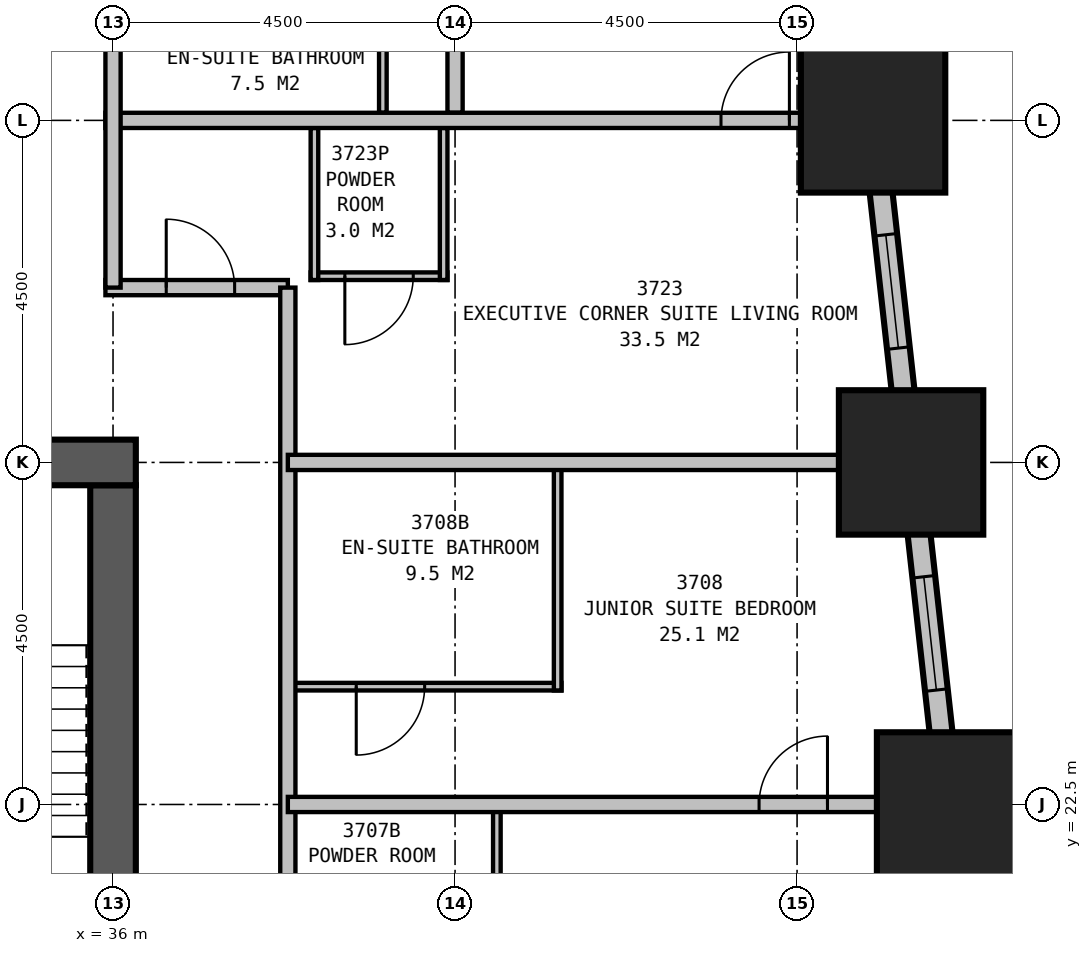
"""IFC4 building model, lengths in metres.
Left out: names, types, materials, properties, quantities, classifications, styles, units other than length and angle.
Written with IfcOpenShell. Run it as: python <this file> out.ifc"""

import sys

from ifc_helpers import new_model, si_unit, direction, frame, frame_2d, origin, origin_2d, place, context, subcontext, project, spatial, rectangle, extrude, element, fill, save


model = new_model("IFC4")
c1 = context("Model", 3, precision=1e-05, world=origin(), true_north=direction((0.0, 1.0)))
c2 = subcontext(c1, "Body", "Model", "MODEL_VIEW")
j1 = project(units=[si_unit("LENGTHUNIT", "METRE"), si_unit("PLANEANGLEUNIT", "RADIAN")], contexts=[c1])
p1 = place(None, origin())
s1 = spatial("IfcSite", under=j1, at=p1, CompositionType="ELEMENT")
p2 = place(p1, origin())
s2 = spatial("IfcBuilding", under=s1, at=p2, CompositionType="ELEMENT")
p3 = place(p2, frame((0.0, 0.0, 142.4)))
s3 = spatial("IfcBuildingStorey", under=s2, at=p3, CompositionType="ELEMENT", Elevation=142.4)
for number, where, z_axis, x_axis in (
    (1, (47.0, 22.5, 0.0), (0.0, 0.0, 1.0), (1.0, 0.0, 0.0)),
    (2, (46.5, 27.0, 0.0), (0.0, 0.0, 1.0), (1.0, 0.0, 0.0)),
    (3, (46.0, 31.5, 0.0), (0.0, 0.0, 1.0), (1.0, 0.0, 0.0)),
):
    element("IfcColumn", number, at=place(p3, frame(where, z_axis=z_axis, x_axis=x_axis)), inside=s3, PredefinedType="COLUMN", context=c2, shape_type="SweptSolid", body=[
        extrude(rectangle(XDim=1.9, YDim=1.9, at=origin_2d()), origin(), (0.0, 0.0, 1.0), 3.5),
    ])
p4 = place(p3, frame((36.3, 27.0, 0.0), z_axis=(0.0, 0.0, 1.0), x_axis=(-1.0, 0.0, 0.0)))
e4 = element("IfcWall", 4, at=p4, inside=s3, PredefinedType="SHEAR", context=c2, shape_type="SweptSolid", body=[
    extrude(rectangle(XDim=23.1, YDim=0.6, at=frame_2d((11.55, 0.0))), origin(), (0.0, 0.0, 1.0), 3.5),
])
p5 = place(p4, frame((17.05, 0.0, 0.0)))
e5 = element("IfcOpeningElement", 5, at=p5, cuts=e4, PredefinedType="OPENING", context=c2, shape_type="SweptSolid", body=[
    extrude(rectangle(XDim=1.0, YDim=2.1, at=frame_2d((0.5, 1.05))), frame((0.0, 0.31, 0.0), z_axis=(0.0, -1.0, 0.0), x_axis=(1.0, 0.0, 0.0)), (0.0, 0.0, 1.0), 0.62),
])
p6 = place(p4, frame((12.05, 0.0, 0.0)))
e6 = element("IfcOpeningElement", 6, at=p6, cuts=e4, PredefinedType="OPENING", context=c2, shape_type="SweptSolid", body=[
    extrude(rectangle(XDim=1.0, YDim=2.1, at=frame_2d((0.5, 1.05))), frame((0.0, 0.31, 0.0), z_axis=(0.0, -1.0, 0.0), x_axis=(1.0, 0.0, 0.0)), (0.0, 0.0, 1.0), 0.62),
])
p7 = place(p4, frame((7.05, 0.0, 0.0)))
e7 = element("IfcOpeningElement", 7, at=p7, cuts=e4, PredefinedType="OPENING", context=c2, shape_type="SweptSolid", body=[
    extrude(rectangle(XDim=1.0, YDim=2.1, at=frame_2d((0.5, 1.05))), frame((0.0, 0.31, 0.0), z_axis=(0.0, -1.0, 0.0), x_axis=(1.0, 0.0, 0.0)), (0.0, 0.0, 1.0), 0.62),
])
p8 = place(p3, frame((36.0, 20.0, 0.0), z_axis=(0.0, 0.0, 1.0), x_axis=(0.0, 1.0, 0.0)))
e8 = element("IfcWall", 8, at=p8, inside=s3, PredefinedType="SHEAR", context=c2, shape_type="SweptSolid", body=[
    extrude(rectangle(XDim=6.7, YDim=0.6, at=frame_2d((3.35, 0.0))), origin(), (0.0, 0.0, 1.0), 3.5),
])
p9 = place(p3, frame((49.017, 4.351, 0.0), z_axis=(0.0, 0.0, 1.0), x_axis=(-0.110433201132, 0.993883548555, 0.0)))
e9 = element("IfcWall", 9, at=p9, inside=s3, PredefinedType="STANDARD", context=c2, shape_type="SweptSolid", body=[
    extrude(rectangle(XDim=31.994, YDim=0.3, at=frame_2d((15.997, 0.0))), origin(), (0.0, 0.0, 1.0), 2.1),
])
p10 = place(p9, frame((1.664, 0.0, 0.5)))
e10 = element("IfcOpeningElement", 10, at=p10, cuts=e9, PredefinedType="OPENING", context=c2, shape_type="SweptSolid", body=[
    extrude(rectangle(XDim=1.5, YDim=1.4, at=frame_2d((0.75, 0.7))), frame((0.0, 0.16, 0.0), z_axis=(0.0, -1.0, 0.0), x_axis=(1.0, 0.0, 0.0)), (0.0, 0.0, 1.0), 0.32),
])
p11 = place(p9, frame((6.192, 0.0, 0.5)))
e11 = element("IfcOpeningElement", 11, at=p11, cuts=e9, PredefinedType="OPENING", context=c2, shape_type="SweptSolid", body=[
    extrude(rectangle(XDim=1.5, YDim=1.4, at=frame_2d((0.75, 0.7))), frame((0.0, 0.16, 0.0), z_axis=(0.0, -1.0, 0.0), x_axis=(1.0, 0.0, 0.0)), (0.0, 0.0, 1.0), 0.32),
])
p12 = place(p9, frame((10.719, 0.0, 0.5)))
e12 = element("IfcOpeningElement", 12, at=p12, cuts=e9, PredefinedType="OPENING", context=c2, shape_type="SweptSolid", body=[
    extrude(rectangle(XDim=1.5, YDim=1.4, at=frame_2d((0.75, 0.7))), frame((0.0, 0.16, 0.0), z_axis=(0.0, -1.0, 0.0), x_axis=(1.0, 0.0, 0.0)), (0.0, 0.0, 1.0), 0.32),
])
p13 = place(p9, frame((15.247, 0.0, 0.5)))
e13 = element("IfcOpeningElement", 13, at=p13, cuts=e9, PredefinedType="OPENING", context=c2, shape_type="SweptSolid", body=[
    extrude(rectangle(XDim=1.5, YDim=1.4, at=frame_2d((0.75, 0.7))), frame((0.0, 0.16, 0.0), z_axis=(0.0, -1.0, 0.0), x_axis=(1.0, 0.0, 0.0)), (0.0, 0.0, 1.0), 0.32),
])
p14 = place(p9, frame((19.775, 0.0, 0.5)))
e14 = element("IfcOpeningElement", 14, at=p14, cuts=e9, PredefinedType="OPENING", context=c2, shape_type="SweptSolid", body=[
    extrude(rectangle(XDim=1.5, YDim=1.4, at=frame_2d((0.75, 0.7))), frame((0.0, 0.16, 0.0), z_axis=(0.0, -1.0, 0.0), x_axis=(1.0, 0.0, 0.0)), (0.0, 0.0, 1.0), 0.32),
])
p15 = place(p9, frame((24.302, 0.0, 0.5)))
e15 = element("IfcOpeningElement", 15, at=p15, cuts=e9, PredefinedType="OPENING", context=c2, shape_type="SweptSolid", body=[
    extrude(rectangle(XDim=1.5, YDim=1.4, at=frame_2d((0.75, 0.7))), frame((0.0, 0.16, 0.0), z_axis=(0.0, -1.0, 0.0), x_axis=(1.0, 0.0, 0.0)), (0.0, 0.0, 1.0), 0.32),
])
p16 = place(p9, frame((28.83, 0.0, 0.5)))
e16 = element("IfcOpeningElement", 16, at=p16, cuts=e9, PredefinedType="OPENING", context=c2, shape_type="SweptSolid", body=[
    extrude(rectangle(XDim=1.5, YDim=1.4, at=frame_2d((0.75, 0.7))), frame((0.0, 0.16, 0.0), z_axis=(0.0, -1.0, 0.0), x_axis=(1.0, 0.0, 0.0)), (0.0, 0.0, 1.0), 0.32),
])
p17 = place(p3, frame((35.9, 29.3, 0.0), z_axis=(0.0, 0.0, 1.0), x_axis=(1.0, 0.0, 0.0)))
e17 = element("IfcWall", 17, at=p17, inside=s3, PredefinedType="PARTITIONING", context=c2, shape_type="SweptSolid", body=[
    extrude(rectangle(XDim=2.4, YDim=0.2, at=frame_2d((1.2, 0.0))), origin(), (0.0, 0.0, 1.0), 3.25),
])
p18 = place(p17, frame((0.8, 0.0, 0.0)))
e18 = element("IfcOpeningElement", 18, at=p18, cuts=e17, PredefinedType="OPENING", context=c2, shape_type="SweptSolid", body=[
    extrude(rectangle(XDim=0.9, YDim=2.1, at=frame_2d((0.45, 1.05))), frame((0.0, 0.11, 0.0), z_axis=(0.0, -1.0, 0.0), x_axis=(1.0, 0.0, 0.0)), (0.0, 0.0, 1.0), 0.22),
])
p19 = place(p3, frame((38.3, 11.2, 0.0), z_axis=(0.0, 0.0, 1.0), x_axis=(0.0, 1.0, 0.0)))
e19 = element("IfcWall", 19, at=p19, inside=s3, PredefinedType="PARTITIONING", context=c2, shape_type="SweptSolid", body=[
    extrude(rectangle(XDim=18.1, YDim=0.2, at=frame_2d((9.05, 0.0))), origin(), (0.0, 0.0, 1.0), 3.25),
])
p20 = place(p19, frame((5.0, 0.0, 0.0), z_axis=(0.0, 0.0, 1.0), x_axis=(-1.0, 0.0, 0.0)))
e20 = element("IfcOpeningElement", 20, at=p20, cuts=e19, PredefinedType="OPENING", context=c2, shape_type="SweptSolid", body=[
    extrude(rectangle(XDim=1.0, YDim=2.1, at=frame_2d((0.5, 1.05))), frame((0.0, 0.11, 0.0), z_axis=(0.0, -1.0, 0.0), x_axis=(1.0, 0.0, 0.0)), (0.0, 0.0, 1.0), 0.22),
])
p21 = place(p19, frame((8.55, 0.0, 0.0), z_axis=(0.0, 0.0, 1.0), x_axis=(-1.0, 0.0, 0.0)))
e21 = element("IfcOpeningElement", 21, at=p21, cuts=e19, PredefinedType="OPENING", context=c2, shape_type="SweptSolid", body=[
    extrude(rectangle(XDim=0.9, YDim=2.1, at=frame_2d((0.45, 1.05))), frame((0.0, 0.11, 0.0), z_axis=(0.0, -1.0, 0.0), x_axis=(1.0, 0.0, 0.0)), (0.0, 0.0, 1.0), 0.22),
])
p22 = place(p3, frame((38.3, 22.5, 0.0), z_axis=(0.0, 0.0, 1.0), x_axis=(1.0, 0.0, 0.0)))
e22 = element("IfcWall", 22, at=p22, inside=s3, PredefinedType="PARTITIONING", context=c2, shape_type="SweptSolid", body=[
    extrude(rectangle(XDim=8.699, YDim=0.2, at=frame_2d((4.35, 0.0))), origin(), (0.0, 0.0, 1.0), 2.2),
])
p23 = place(p22, frame((6.2, 0.0, 0.0)))
e23 = element("IfcOpeningElement", 23, at=p23, cuts=e22, PredefinedType="OPENING", context=c2, shape_type="SweptSolid", body=[
    extrude(rectangle(XDim=0.9, YDim=2.1, at=frame_2d((0.45, 1.05))), frame((0.0, 0.11, 0.0), z_axis=(0.0, -1.0, 0.0), x_axis=(1.0, 0.0, 0.0)), (0.0, 0.0, 1.0), 0.22),
])
p24 = place(p3, frame((41.05, 20.1, 0.0), z_axis=(0.0, 0.0, 1.0), x_axis=(0.0, 1.0, 0.0)))
e24 = element("IfcWall", 24, at=p24, inside=s3, PredefinedType="PLUMBINGWALL", context=c2, shape_type="SweptSolid", body=[
    extrude(rectangle(XDim=2.4, YDim=0.1, at=frame_2d((1.2, 0.0))), origin(), (0.0, 0.0, 1.0), 3.25),
])
p25 = place(p3, frame((41.85, 24.0, 0.0), z_axis=(0.0, 0.0, 1.0), x_axis=(0.0, 1.0, 0.0)))
e25 = element("IfcWall", 25, at=p25, inside=s3, PredefinedType="PLUMBINGWALL", context=c2, shape_type="SweptSolid", body=[
    extrude(rectangle(XDim=3.0, YDim=0.1, at=frame_2d((1.5, 0.0))), origin(), (0.0, 0.0, 1.0), 3.25),
])
p26 = place(p3, frame((38.3, 24.05, 0.0), z_axis=(0.0, 0.0, 1.0), x_axis=(1.0, 0.0, 0.0)))
e26 = element("IfcWall", 26, at=p26, inside=s3, PredefinedType="PLUMBINGWALL", context=c2, shape_type="SweptSolid", body=[
    extrude(rectangle(XDim=3.6, YDim=0.1, at=frame_2d((1.8, 0.0))), origin(), (0.0, 0.0, 1.0), 3.25),
])
p27 = place(p26, frame((1.8, 0.0, 0.0), z_axis=(0.0, 0.0, 1.0), x_axis=(-1.0, 0.0, 0.0)))
e27 = element("IfcOpeningElement", 27, at=p27, cuts=e26, PredefinedType="OPENING", context=c2, shape_type="SweptSolid", body=[
    extrude(rectangle(XDim=0.9, YDim=2.1, at=frame_2d((0.45, 1.05))), frame((0.0, 0.06, 0.0), z_axis=(0.0, -1.0, 0.0), x_axis=(1.0, 0.0, 0.0)), (0.0, 0.0, 1.0), 0.12),
])
p28 = place(p3, frame((38.3, 27.0, 0.0), z_axis=(0.0, 0.0, 1.0), x_axis=(1.0, 0.0, 0.0)))
e28 = element("IfcWall", 28, at=p28, inside=s3, PredefinedType="PARTITIONING", context=c2, shape_type="SweptSolid", body=[
    extrude(rectangle(XDim=7.977, YDim=0.2, at=frame_2d((3.988, 0.0))), origin(), (0.0, 0.0, 1.0), 1.9),
])
p29 = place(p3, frame((36.0, 29.3, 0.0), z_axis=(0.0, 0.0, 1.0), x_axis=(0.0, 1.0, 0.0)))
e29 = element("IfcWall", 29, at=p29, inside=s3, PredefinedType="PARTITIONING", context=c2, shape_type="SweptSolid", body=[
    extrude(rectangle(XDim=11.2, YDim=0.2, at=frame_2d((5.6, 0.0))), origin(), (0.0, 0.0, 1.0), 2.2),
])
p30 = place(p3, frame((35.9, 31.5, 0.0), z_axis=(0.0, 0.0, 1.0), x_axis=(1.0, 0.0, 0.0)))
e30 = element("IfcWall", 30, at=p30, inside=s3, PredefinedType="PARTITIONING", context=c2, shape_type="SweptSolid", body=[
    extrude(rectangle(XDim=10.099, YDim=0.2, at=frame_2d((5.05, 0.0))), origin(), (0.0, 0.0, 1.0), 3.25),
])
p31 = place(p30, frame((8.099, 0.0, 0.0)))
e31 = element("IfcOpeningElement", 31, at=p31, cuts=e30, PredefinedType="OPENING", context=c2, shape_type="SweptSolid", body=[
    extrude(rectangle(XDim=0.9, YDim=2.1, at=frame_2d((0.45, 1.05))), frame((0.0, 0.11, 0.0), z_axis=(0.0, -1.0, 0.0), x_axis=(1.0, 0.0, 0.0)), (0.0, 0.0, 1.0), 0.22),
])
p32 = place(p3, frame((40.35, 31.4, 0.0), z_axis=(0.0, 0.0, 1.0), x_axis=(0.0, -1.0, 0.0)))
e32 = element("IfcWall", 32, at=p32, inside=s3, PredefinedType="PLUMBINGWALL", context=c2, shape_type="SweptSolid", body=[
    extrude(rectangle(XDim=2.0, YDim=0.1, at=frame_2d((1.0, 0.0))), origin(), (0.0, 0.0, 1.0), 2.2),
])
p33 = place(p3, frame((38.65, 31.4, 0.0), z_axis=(0.0, 0.0, 1.0), x_axis=(0.0, -1.0, 0.0)))
e33 = element("IfcWall", 33, at=p33, inside=s3, PredefinedType="PLUMBINGWALL", context=c2, shape_type="SweptSolid", body=[
    extrude(rectangle(XDim=2.0, YDim=0.1, at=frame_2d((1.0, 0.0))), origin(), (0.0, 0.0, 1.0), 3.25),
])
p34 = place(p3, frame((38.6, 29.45, 0.0), z_axis=(0.0, 0.0, 1.0), x_axis=(1.0, 0.0, 0.0)))
e34 = element("IfcWall", 34, at=p34, inside=s3, PredefinedType="PLUMBINGWALL", context=c2, shape_type="SweptSolid", body=[
    extrude(rectangle(XDim=1.8, YDim=0.1, at=frame_2d((0.9, 0.0))), origin(), (0.0, 0.0, 1.0), 3.25),
])
p35 = place(p34, frame((1.35, 0.0, 0.0), z_axis=(0.0, 0.0, 1.0), x_axis=(-1.0, 0.0, 0.0)))
e35 = element("IfcOpeningElement", 35, at=p35, cuts=e34, PredefinedType="OPENING", context=c2, shape_type="SweptSolid", body=[
    extrude(rectangle(XDim=0.9, YDim=2.1, at=frame_2d((0.45, 1.05))), frame((0.0, 0.06, 0.0), z_axis=(0.0, -1.0, 0.0), x_axis=(1.0, 0.0, 0.0)), (0.0, 0.0, 1.0), 0.12),
])
p36 = place(p3, frame((40.5, 31.6, 0.0), z_axis=(0.0, 0.0, 1.0), x_axis=(0.0, 1.0, 0.0)))
e36 = element("IfcWall", 36, at=p36, inside=s3, PredefinedType="PARTITIONING", context=c2, shape_type="SweptSolid", body=[
    extrude(rectangle(XDim=4.4, YDim=0.2, at=frame_2d((2.2, 0.0))), origin(), (0.0, 0.0, 1.0), 2.2),
])
p37 = place(p36, frame((2.4, 0.0, 0.0)))
e37 = element("IfcOpeningElement", 37, at=p37, cuts=e36, PredefinedType="OPENING", context=c2, shape_type="SweptSolid", body=[
    extrude(rectangle(XDim=0.9, YDim=2.1, at=frame_2d((0.45, 1.05))), frame((0.0, 0.11, 0.0), z_axis=(0.0, -1.0, 0.0), x_axis=(1.0, 0.0, 0.0)), (0.0, 0.0, 1.0), 0.22),
])
p38 = place(p3, frame((39.55, 31.6, 0.0), z_axis=(0.0, 0.0, 1.0), x_axis=(0.0, 1.0, 0.0)))
e38 = element("IfcWall", 38, at=p38, inside=s3, PredefinedType="PLUMBINGWALL", context=c2, shape_type="SweptSolid", body=[
    extrude(rectangle(XDim=2.3, YDim=0.1, at=frame_2d((1.15, 0.0))), origin(), (0.0, 0.0, 1.0), 3.25),
])
p39 = place(p14, origin())
e39 = element("IfcWindow", 39, at=p39, inside=s3, PartitioningType="SINGLE_PANEL", PredefinedType="WINDOW", context=c2, shape_type="SweptSolid", body=[
    extrude(rectangle(XDim=1.5, YDim=1.4, at=frame_2d((0.75, 0.7))), frame((0.0, 0.03, 0.0), z_axis=(0.0, -1.0, 0.0), x_axis=(1.0, 0.0, 0.0)), (0.0, 0.0, 1.0), 0.06),
])
fill(e14, e39)
p40 = place(p15, origin())
e40 = element("IfcWindow", 40, at=p40, inside=s3, PartitioningType="SINGLE_PANEL", PredefinedType="WINDOW", context=c2, shape_type="SweptSolid", body=[
    extrude(rectangle(XDim=1.5, YDim=1.4, at=frame_2d((0.75, 0.7))), frame((0.0, 0.03, 0.0), z_axis=(0.0, -1.0, 0.0), x_axis=(1.0, 0.0, 0.0)), (0.0, 0.0, 1.0), 0.06),
])
fill(e15, e40)
p41 = place(p18, origin())
e41 = element("IfcDoor", 41, at=p41, inside=s3, OperationType="SINGLE_SWING_LEFT", PredefinedType="DOOR", context=c2, shape_type="SweptSolid", body=[
    extrude(rectangle(XDim=0.9, YDim=2.1, at=frame_2d((0.45, 1.05))), frame((0.0, 0.025, 0.0), z_axis=(0.0, -1.0, 0.0), x_axis=(1.0, 0.0, 0.0)), (0.0, 0.0, 1.0), 0.05),
])
fill(e18, e41)
p42 = place(p23, origin())
e42 = element("IfcDoor", 42, at=p42, inside=s3, OperationType="SINGLE_SWING_RIGHT", PredefinedType="DOOR", context=c2, shape_type="SweptSolid", body=[
    extrude(rectangle(XDim=0.9, YDim=2.1, at=frame_2d((0.45, 1.05))), frame((0.0, 0.025, 0.0), z_axis=(0.0, -1.0, 0.0), x_axis=(1.0, 0.0, 0.0)), (0.0, 0.0, 1.0), 0.05),
])
fill(e23, e42)
p43 = place(p27, origin())
e43 = element("IfcDoor", 43, at=p43, inside=s3, OperationType="SINGLE_SWING_RIGHT", PredefinedType="DOOR", context=c2, shape_type="SweptSolid", body=[
    extrude(rectangle(XDim=0.9, YDim=2.1, at=frame_2d((0.45, 1.05))), frame((0.0, 0.025, 0.0), z_axis=(0.0, -1.0, 0.0), x_axis=(1.0, 0.0, 0.0)), (0.0, 0.0, 1.0), 0.05),
])
fill(e27, e43)
p44 = place(p31, origin())
e44 = element("IfcDoor", 44, at=p44, inside=s3, OperationType="SINGLE_SWING_RIGHT", PredefinedType="DOOR", context=c2, shape_type="SweptSolid", body=[
    extrude(rectangle(XDim=0.9, YDim=2.1, at=frame_2d((0.45, 1.05))), frame((0.0, 0.025, 0.0), z_axis=(0.0, -1.0, 0.0), x_axis=(1.0, 0.0, 0.0)), (0.0, 0.0, 1.0), 0.05),
])
fill(e31, e44)
p45 = place(p35, origin())
e45 = element("IfcDoor", 45, at=p45, inside=s3, OperationType="SINGLE_SWING_RIGHT", PredefinedType="DOOR", context=c2, shape_type="SweptSolid", body=[
    extrude(rectangle(XDim=0.9, YDim=2.1, at=frame_2d((0.45, 1.05))), frame((0.0, 0.025, 0.0), z_axis=(0.0, -1.0, 0.0), x_axis=(1.0, 0.0, 0.0)), (0.0, 0.0, 1.0), 0.05),
])
fill(e35, e45)
save(model, sys.argv[1])
